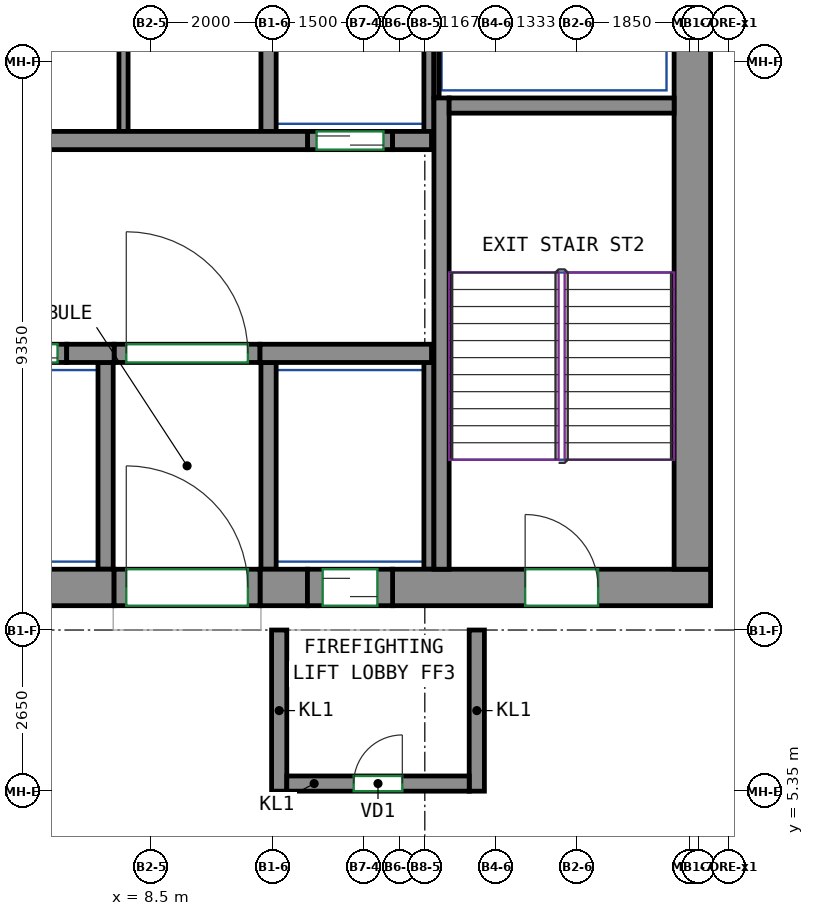
"""IFC4 building model, lengths in metres.
Left out: names, types, materials, properties, quantities, classifications, styles, units other than length and angle.
Written with IfcOpenShell. Run it as: python <this file> out.ifc"""

import sys

from ifc_helpers import new_model, si_unit, direction, frame, frame_2d, origin, place, context, subcontext, project, spatial, rectangle, extrude, source, transform, mapped, element, fill, save


model = new_model("IFC4")
c1 = context("Model", 3, precision=1e-05, world=origin(), true_north=direction((0.0, 1.0)))
c2 = subcontext(c1, "Body", "Model", "MODEL_VIEW")
j1 = project(units=[si_unit("LENGTHUNIT", "METRE"), si_unit("PLANEANGLEUNIT", "RADIAN")], contexts=[c1])
p1 = place(None, origin())
s1 = spatial("IfcSite", under=j1, at=p1, CompositionType="ELEMENT")
p2 = place(p1, origin())
s2 = spatial("IfcBuilding", under=s1, at=p2, CompositionType="ELEMENT")
p3 = place(p2, frame((0.0, 0.0, 262.8)))
s3 = spatial("IfcBuildingStorey", under=s2, at=p3, CompositionType="ELEMENT", Elevation=262.8)
m1 = source(origin(), c2, "Body", "SweptSolid", [
    extrude(rectangle(XDim=14.18, YDim=0.6, at=frame_2d((7.09, 0.0))), origin(), (0.0, 0.0, 1.0), 3.8),
])
p4 = place(p3, frame((-6.29, 8.7, 0.0), z_axis=(0.0, 0.0, 1.0), x_axis=(1.0, 0.0, 0.0)))
e1 = element("IfcWall", 1, at=p4, inside=s3, PredefinedType="SHEAR", context=c2, shape_type="MappedRepresentation", body=[
    mapped(m1, transform((0.0, 0.0, 0.0))),
])
m2 = source(origin(), c2, "Body", "SweptSolid", [
    extrude(rectangle(XDim=0.78, YDim=0.6, at=frame_2d((0.39, 0.0))), origin(), (0.0, 0.0, 1.0), 3.8),
])
p5 = place(p3, frame((10.29, 8.7, 0.0), z_axis=(0.0, 0.0, 1.0), x_axis=(1.0, 0.0, 0.0)))
e2 = element("IfcWall", 2, at=p5, inside=s3, PredefinedType="SHEAR", context=c2, shape_type="MappedRepresentation", body=[
    mapped(m2, transform((0.0, 0.0, 0.0))),
])
m3 = source(origin(), c2, "Body", "SweptSolid", [
    extrude(rectangle(XDim=5.23, YDim=0.6, at=frame_2d((2.615, 0.0))), origin(), (0.0, 0.0, 1.0), 3.8),
])
p6 = place(p3, frame((12.47, 8.7, 0.0), z_axis=(0.0, 0.0, 1.0), x_axis=(1.0, 0.0, 0.0)))
e3 = element("IfcWall", 3, at=p6, inside=s3, PredefinedType="SHEAR", context=c2, shape_type="MappedRepresentation", body=[
    mapped(m3, transform((0.0, 0.0, 0.0))),
])
p7 = place(p6, frame((2.18, 0.0, 0.0)))
e4 = element("IfcOpeningElement", 4, at=p7, cuts=e3, PredefinedType="OPENING", context=c2, shape_type="SweptSolid", body=[
    extrude(rectangle(XDim=1.2, YDim=2.1, at=frame_2d((0.6, 1.05))), frame((0.0, 0.31, 0.0), z_axis=(0.0, -1.0, 0.0), x_axis=(1.0, 0.0, 0.0)), (0.0, 0.0, 1.0), 0.62),
])
m4 = source(origin(), c2, "Body", "SweptSolid", [
    extrude(rectangle(XDim=12.0, YDim=0.6, at=frame_2d((6.0, 0.0))), origin(), (0.0, 0.0, 1.0), 3.8),
])
p8 = place(p3, frame((17.4, 9.0, 0.0), z_axis=(0.0, 0.0, 1.0), x_axis=(0.0, 1.0, 0.0)))
e5 = element("IfcWall", 5, at=p8, inside=s3, PredefinedType="SHEAR", context=c2, shape_type="MappedRepresentation", body=[
    mapped(m4, transform((0.0, 0.0, 0.0))),
])
m5 = source(origin(), c2, "Body", "SweptSolid", [
    extrude(rectangle(XDim=7.75, YDim=0.25, at=frame_2d((3.875, 0.0))), origin(), (0.0, 0.0, 1.0), 3.8),
])
p9 = place(p3, frame((13.275, 9.0, 0.0), z_axis=(0.0, 0.0, 1.0), x_axis=(0.0, 1.0, 0.0)))
e6 = element("IfcWall", 6, at=p9, inside=s3, PredefinedType="SHEAR", context=c2, shape_type="MappedRepresentation", body=[
    mapped(m5, transform((0.0, 0.0, 0.0))),
])
m6 = source(origin(), c2, "Body", "SweptSolid", [
    extrude(rectangle(XDim=3.7, YDim=0.25, at=frame_2d((1.85, 0.0))), origin(), (0.0, 0.0, 1.0), 3.8),
])
p10 = place(p3, frame((13.4, 16.625, 0.0), z_axis=(0.0, 0.0, 1.0), x_axis=(1.0, 0.0, 0.0)))
e7 = element("IfcWall", 7, at=p10, inside=s3, PredefinedType="SHEAR", context=c2, shape_type="MappedRepresentation", body=[
    mapped(m6, transform((0.0, 0.0, 0.0))),
])
m7 = source(origin(), c2, "Body", "SweptSolid", [
    extrude(rectangle(XDim=0.78, YDim=0.3, at=frame_2d((0.39, 0.0))), origin(), (0.0, 0.0, 1.0), 3.8),
])
p11 = place(p3, frame((7.11, 12.55, 0.0), z_axis=(0.0, 0.0, 1.0), x_axis=(1.0, 0.0, 0.0)))
e8 = element("IfcWall", 8, at=p11, inside=s3, PredefinedType="SHEAR", context=c2, shape_type="MappedRepresentation", body=[
    mapped(m7, transform((0.0, 0.0, 0.0))),
])
m8 = source(origin(), c2, "Body", "SweptSolid", [
    extrude(rectangle(XDim=2.82, YDim=0.3, at=frame_2d((1.41, 0.0))), origin(), (0.0, 0.0, 1.0), 3.8),
])
p12 = place(p3, frame((10.29, 12.55, 0.0), z_axis=(0.0, 0.0, 1.0), x_axis=(1.0, 0.0, 0.0)))
e9 = element("IfcWall", 9, at=p12, inside=s3, PredefinedType="SHEAR", context=c2, shape_type="MappedRepresentation", body=[
    mapped(m8, transform((0.0, 0.0, 0.0))),
])
m9 = source(origin(), c2, "Body", "SweptSolid", [
    extrude(rectangle(XDim=22.08, YDim=0.3, at=frame_2d((11.04, 0.0))), origin(), (0.0, 0.0, 1.0), 3.8),
])
p13 = place(p3, frame((-11.01, 16.05, 0.0), z_axis=(0.0, 0.0, 1.0), x_axis=(1.0, 0.0, 0.0)))
e10 = element("IfcWall", 10, at=p13, inside=s3, PredefinedType="SHEAR", context=c2, shape_type="MappedRepresentation", body=[
    mapped(m9, transform((0.0, 0.0, 0.0))),
])
m10 = source(origin(), c2, "Body", "SweptSolid", [
    extrude(rectangle(XDim=0.64, YDim=0.3, at=frame_2d((0.32, 0.0))), origin(), (0.0, 0.0, 1.0), 3.8),
])
p14 = place(p3, frame((12.47, 16.05, 0.0), z_axis=(0.0, 0.0, 1.0), x_axis=(1.0, 0.0, 0.0)))
e11 = element("IfcWall", 11, at=p14, inside=s3, PredefinedType="SHEAR", context=c2, shape_type="MappedRepresentation", body=[
    mapped(m10, transform((0.0, 0.0, 0.0))),
])
m11 = source(origin(), c2, "Body", "SweptSolid", [
    extrude(rectangle(XDim=1.4, YDim=0.3, at=frame_2d((0.7, 0.0))), origin(), (0.0, 0.0, 1.0), 3.8),
])
p15 = place(p3, frame((5.71, 12.55, 0.0), z_axis=(0.0, 0.0, 1.0), x_axis=(1.0, 0.0, 0.0)))
e12 = element("IfcWall", 12, at=p15, inside=s3, PredefinedType="PARTITIONING", context=c2, shape_type="MappedRepresentation", body=[
    mapped(m11, transform((0.0, 0.0, 0.0))),
])
p16 = place(p15, frame((0.15, 0.0, 0.0)))
e13 = element("IfcOpeningElement", 13, at=p16, cuts=e12, PredefinedType="OPENING", context=c2, shape_type="SweptSolid", body=[
    extrude(rectangle(XDim=1.1, YDim=2.1, at=frame_2d((0.55, 1.05))), frame((0.0, 0.16, 0.0), z_axis=(0.0, -1.0, 0.0), x_axis=(1.0, 0.0, 0.0)), (0.0, 0.0, 1.0), 0.32),
])
m12 = source(origin(), c2, "Body", "SweptSolid", [
    extrude(rectangle(XDim=1.4, YDim=0.3, at=frame_2d((0.7, 0.0))), origin(), (0.0, 0.0, 1.0), 3.8),
])
p17 = place(p3, frame((11.07, 16.05, 0.0), z_axis=(0.0, 0.0, 1.0), x_axis=(1.0, 0.0, 0.0)))
e14 = element("IfcWall", 14, at=p17, inside=s3, PredefinedType="PARTITIONING", context=c2, shape_type="MappedRepresentation", body=[
    mapped(m12, transform((0.0, 0.0, 0.0))),
])
p18 = place(p17, frame((0.15, 0.0, 0.0)))
e15 = element("IfcOpeningElement", 15, at=p18, cuts=e14, PredefinedType="OPENING", context=c2, shape_type="SweptSolid", body=[
    extrude(rectangle(XDim=1.1, YDim=2.1, at=frame_2d((0.55, 1.05))), frame((0.0, 0.16, 0.0), z_axis=(0.0, -1.0, 0.0), x_axis=(1.0, 0.0, 0.0)), (0.0, 0.0, 1.0), 0.32),
])
m13 = source(origin(), c2, "Body", "SweptSolid", [
    extrude(rectangle(XDim=2.4, YDim=0.3, at=frame_2d((1.2, 0.0))), origin(), (0.0, 0.0, 1.0), 3.8),
])
p19 = place(p3, frame((7.89, 12.55, 0.0), z_axis=(0.0, 0.0, 1.0), x_axis=(1.0, 0.0, 0.0)))
e16 = element("IfcWall", 16, at=p19, inside=s3, PredefinedType="PARTITIONING", context=c2, shape_type="MappedRepresentation", body=[
    mapped(m13, transform((0.0, 0.0, 0.0))),
])
p20 = place(p19, frame((0.2, 0.0, 0.0)))
e17 = element("IfcOpeningElement", 17, at=p20, cuts=e16, PredefinedType="OPENING", context=c2, shape_type="SweptSolid", body=[
    extrude(rectangle(XDim=2.0, YDim=2.1, at=frame_2d((1.0, 1.05))), frame((0.0, 0.16, 0.0), z_axis=(0.0, -1.0, 0.0), x_axis=(1.0, 0.0, 0.0)), (0.0, 0.0, 1.0), 0.32),
])
m14 = source(origin(), c2, "Body", "SweptSolid", [
    extrude(rectangle(XDim=2.65, YDim=0.25, at=frame_2d((1.325, 0.0))), origin(), (0.0, 0.0, 1.0), 3.8),
])
for number, where, z_axis, x_axis in (
    (18, (10.605, 5.35, 0.0), (0.0, 0.0, 1.0), (0.0, 1.0, 0.0)),
    (19, (13.855, 5.35, 0.0), (0.0, 0.0, 1.0), (0.0, 1.0, 0.0)),
):
    element("IfcWall", number, at=place(p3, frame(where, z_axis=z_axis, x_axis=x_axis)), inside=s3, PredefinedType="PARTITIONING", context=c2, shape_type="MappedRepresentation", body=[
        mapped(m14, transform((0.0, 0.0, 0.0))),
    ])
m15 = source(origin(), c2, "Body", "SweptSolid", [
    extrude(rectangle(XDim=3.0, YDim=0.25, at=frame_2d((1.5, 0.0))), origin(), (0.0, 0.0, 1.0), 3.8),
])
p21 = place(p3, frame((10.73, 5.475, 0.0), z_axis=(0.0, 0.0, 1.0), x_axis=(1.0, 0.0, 0.0)))
e20 = element("IfcWall", 20, at=p21, inside=s3, PredefinedType="PARTITIONING", context=c2, shape_type="MappedRepresentation", body=[
    mapped(m15, transform((0.0, 0.0, 0.0))),
])
p22 = place(p21, frame((1.1, 0.0, 0.0)))
e21 = element("IfcOpeningElement", 21, at=p22, cuts=e20, PredefinedType="OPENING", context=c2, shape_type="SweptSolid", body=[
    extrude(rectangle(XDim=0.8, YDim=2.0, at=frame_2d((0.4, 1.0))), frame((0.0, 0.135, 0.0), z_axis=(0.0, -1.0, 0.0), x_axis=(1.0, 0.0, 0.0)), (0.0, 0.0, 1.0), 0.27),
])
m16 = source(origin(), c2, "Body", "SweptSolid", [
    extrude(rectangle(XDim=3.275, YDim=0.165, at=frame_2d((1.638, 0.0))), origin(), (0.0, 0.0, 1.0), 3.8),
])
p23 = place(p3, frame((13.067, 16.2, 0.0), z_axis=(0.0, 0.0, 1.0), x_axis=(0.0, 1.0, 0.0)))
e22 = element("IfcWall", 22, at=p23, inside=s3, PredefinedType="PARTITIONING", context=c2, shape_type="MappedRepresentation", body=[
    mapped(m16, transform((0.0, 0.0, 0.0))),
])
m17 = source(origin(), c2, "Body", "SweptSolid", [
    extrude(rectangle(XDim=3.275, YDim=0.25, at=frame_2d((1.638, 0.0))), origin(), (0.0, 0.0, 1.0), 3.8),
])
p24 = place(p3, frame((10.43, 16.2, 0.0), z_axis=(0.0, 0.0, 1.0), x_axis=(0.0, 1.0, 0.0)))
e23 = element("IfcWall", 23, at=p24, inside=s3, PredefinedType="PARTITIONING", context=c2, shape_type="MappedRepresentation", body=[
    mapped(m17, transform((0.0, 0.0, 0.0))),
])
m18 = source(origin(), c2, "Body", "SweptSolid", [
    extrude(rectangle(XDim=2.725, YDim=0.085, at=frame_2d((1.363, 0.0))), origin(), (0.0, 0.0, 1.0), 3.8),
])
p25 = place(p3, frame((13.192, 16.75, 0.0), z_axis=(0.0, 0.0, 1.0), x_axis=(0.0, 1.0, 0.0)))
e24 = element("IfcWall", 24, at=p25, inside=s3, PredefinedType="PARTITIONING", context=c2, shape_type="MappedRepresentation", body=[
    mapped(m18, transform((0.0, 0.0, 0.0))),
])
m19 = source(origin(), c2, "Body", "SweptSolid", [
    extrude(rectangle(XDim=3.4, YDim=0.25, at=frame_2d((1.7, 0.0))), origin(), (0.0, 0.0, 1.0), 3.8),
])
p26 = place(p3, frame((10.43, 9.0, 0.0), z_axis=(0.0, 0.0, 1.0), x_axis=(0.0, 1.0, 0.0)))
e25 = element("IfcWall", 25, at=p26, inside=s3, PredefinedType="PARTITIONING", context=c2, shape_type="MappedRepresentation", body=[
    mapped(m19, transform((0.0, 0.0, 0.0))),
])
m20 = source(origin(), c2, "Body", "SweptSolid", [
    extrude(rectangle(XDim=3.4, YDim=0.165, at=frame_2d((1.7, 0.0))), origin(), (0.0, 0.0, 1.0), 3.8),
])
p27 = place(p3, frame((13.067, 9.0, 0.0), z_axis=(0.0, 0.0, 1.0), x_axis=(0.0, 1.0, 0.0)))
e26 = element("IfcWall", 26, at=p27, inside=s3, PredefinedType="PARTITIONING", context=c2, shape_type="MappedRepresentation", body=[
    mapped(m20, transform((0.0, 0.0, 0.0))),
])
p28 = place(p3, frame((7.75, 9.0, 0.0), z_axis=(0.0, 0.0, 1.0), x_axis=(0.0, 1.0, 0.0)))
e27 = element("IfcWall", 27, at=p28, inside=s3, PredefinedType="PARTITIONING", context=c2, shape_type="MappedRepresentation", body=[
    mapped(m19, transform((0.0, 0.0, 0.0))),
])
m21 = source(origin(), c2, "Body", "SweptSolid", [
    extrude(rectangle(XDim=4.8, YDim=0.15, at=frame_2d((2.4, 0.0))), origin(), (0.0, 0.0, 1.0), 3.8),
])
p29 = place(p3, frame((8.045, 16.2, 0.0), z_axis=(0.0, 0.0, 1.0), x_axis=(0.0, 1.0, 0.0)))
e28 = element("IfcWall", 28, at=p29, inside=s3, PredefinedType="PARTITIONING", context=c2, shape_type="MappedRepresentation", body=[
    mapped(m21, transform((0.0, 0.0, 0.0))),
])
m22 = source(origin(), c2, "Body", "SweptSolid", [
    extrude(rectangle(XDim=2.4, YDim=0.6, at=frame_2d((1.2, 0.0))), origin(), (0.0, 0.0, 1.0), 2.7),
])
p30 = place(p3, frame((7.89, 8.7, 0.0), z_axis=(0.0, 0.0, 1.0), x_axis=(1.0, 0.0, 0.0)))
e29 = element("IfcWall", 29, at=p30, inside=s3, PredefinedType="PARTITIONING", context=c2, shape_type="MappedRepresentation", body=[
    mapped(m22, transform((0.0, 0.0, 0.0))),
])
p31 = place(p30, frame((0.2, 0.0, 0.0)))
e30 = element("IfcOpeningElement", 30, at=p31, cuts=e29, PredefinedType="OPENING", context=c2, shape_type="SweptSolid", body=[
    extrude(rectangle(XDim=2.0, YDim=2.1, at=frame_2d((1.0, 1.05))), frame((0.0, 0.31, 0.0), z_axis=(0.0, -1.0, 0.0), x_axis=(1.0, 0.0, 0.0)), (0.0, 0.0, 1.0), 0.62),
])
m23 = source(origin(), c2, "Body", "SweptSolid", [
    extrude(rectangle(XDim=1.4, YDim=0.6, at=frame_2d((0.7, 0.0))), origin(), (0.0, 0.0, 1.0), 2.7),
])
p32 = place(p3, frame((11.07, 8.7, 0.0), z_axis=(0.0, 0.0, 1.0), x_axis=(1.0, 0.0, 0.0)))
e31 = element("IfcWall", 31, at=p32, inside=s3, PredefinedType="PARTITIONING", context=c2, shape_type="MappedRepresentation", body=[
    mapped(m23, transform((0.0, 0.0, 0.0))),
])
p33 = place(p32, frame((0.25, 0.0, 0.0)))
e32 = element("IfcOpeningElement", 32, at=p33, cuts=e31, PredefinedType="OPENING", context=c2, shape_type="SweptSolid", body=[
    extrude(rectangle(XDim=0.9, YDim=2.1, at=frame_2d((0.45, 1.05))), frame((0.0, 0.31, 0.0), z_axis=(0.0, -1.0, 0.0), x_axis=(1.0, 0.0, 0.0)), (0.0, 0.0, 1.0), 0.62),
])
p34 = place(p20, origin())
e33 = element("IfcDoor", 33, at=p34, inside=s3, OperationType="DOUBLE_DOOR_SINGLE_SWING", PredefinedType="DOOR", context=c2, shape_type="SweptSolid", body=[
    extrude(rectangle(XDim=2.0, YDim=2.1, at=frame_2d((1.0, 1.05))), frame((0.0, 0.025, 0.0), z_axis=(0.0, -1.0, 0.0), x_axis=(1.0, 0.0, 0.0)), (0.0, 0.0, 1.0), 0.05),
])
fill(e17, e33)
p35 = place(p31, origin())
e34 = element("IfcDoor", 34, at=p35, inside=s3, OperationType="DOUBLE_DOOR_SINGLE_SWING", PredefinedType="DOOR", context=c2, shape_type="SweptSolid", body=[
    extrude(rectangle(XDim=2.0, YDim=2.1, at=frame_2d((1.0, 1.05))), frame((0.0, 0.205, 0.0), z_axis=(0.0, -1.0, 0.0), x_axis=(1.0, 0.0, 0.0)), (0.0, 0.0, 1.0), 0.05),
])
fill(e30, e34)
p36 = place(p22, origin())
e35 = element("IfcDoor", 35, at=p36, inside=s3, OperationType="SINGLE_SWING_RIGHT", PredefinedType="DOOR", context=c2, shape_type="SweptSolid", body=[
    extrude(rectangle(XDim=0.8, YDim=2.0, at=frame_2d((0.4, 1.0))), frame((0.0, 0.025, 0.0), z_axis=(0.0, -1.0, 0.0), x_axis=(1.0, 0.0, 0.0)), (0.0, 0.0, 1.0), 0.05),
])
fill(e21, e35)
p37 = place(p33, origin())
e36 = element("IfcDoor", 36, at=p37, inside=s3, OperationType="SLIDING_TO_LEFT", PredefinedType="DOOR", context=c2, shape_type="SweptSolid", body=[
    extrude(rectangle(XDim=0.9, YDim=2.1, at=frame_2d((0.45, 1.05))), frame((0.0, 0.205, 0.0), z_axis=(0.0, -1.0, 0.0), x_axis=(1.0, 0.0, 0.0)), (0.0, 0.0, 1.0), 0.05),
])
fill(e32, e36)
p38 = place(p16, origin())
e37 = element("IfcDoor", 37, at=p38, inside=s3, OperationType="DOUBLE_DOOR_SLIDING", PredefinedType="DOOR", context=c2, shape_type="SweptSolid", body=[
    extrude(rectangle(XDim=1.1, YDim=2.1, at=frame_2d((0.55, 1.05))), frame((0.0, 0.025, 0.0), z_axis=(0.0, -1.0, 0.0), x_axis=(1.0, 0.0, 0.0)), (0.0, 0.0, 1.0), 0.05),
])
fill(e13, e37)
p39 = place(p18, origin())
e38 = element("IfcDoor", 38, at=p39, inside=s3, OperationType="DOUBLE_DOOR_SLIDING", PredefinedType="DOOR", context=c2, shape_type="SweptSolid", body=[
    extrude(rectangle(XDim=1.1, YDim=2.1, at=frame_2d((0.55, 1.05))), frame((0.0, 0.025, 0.0), z_axis=(0.0, -1.0, 0.0), x_axis=(1.0, 0.0, 0.0)), (0.0, 0.0, 1.0), 0.05),
])
fill(e15, e38)
p40 = place(p7, origin())
e39 = element("IfcDoor", 39, at=p40, inside=s3, OperationType="DOUBLE_DOOR_SINGLE_SWING", PredefinedType="DOOR", context=c2, shape_type="SweptSolid", body=[
    extrude(rectangle(XDim=1.2, YDim=2.1, at=frame_2d((0.6, 1.05))), frame((0.0, 0.205, 0.0), z_axis=(0.0, -1.0, 0.0), x_axis=(1.0, 0.0, 0.0)), (0.0, 0.0, 1.0), 0.05),
])
fill(e4, e39)
save(model, sys.argv[1])
